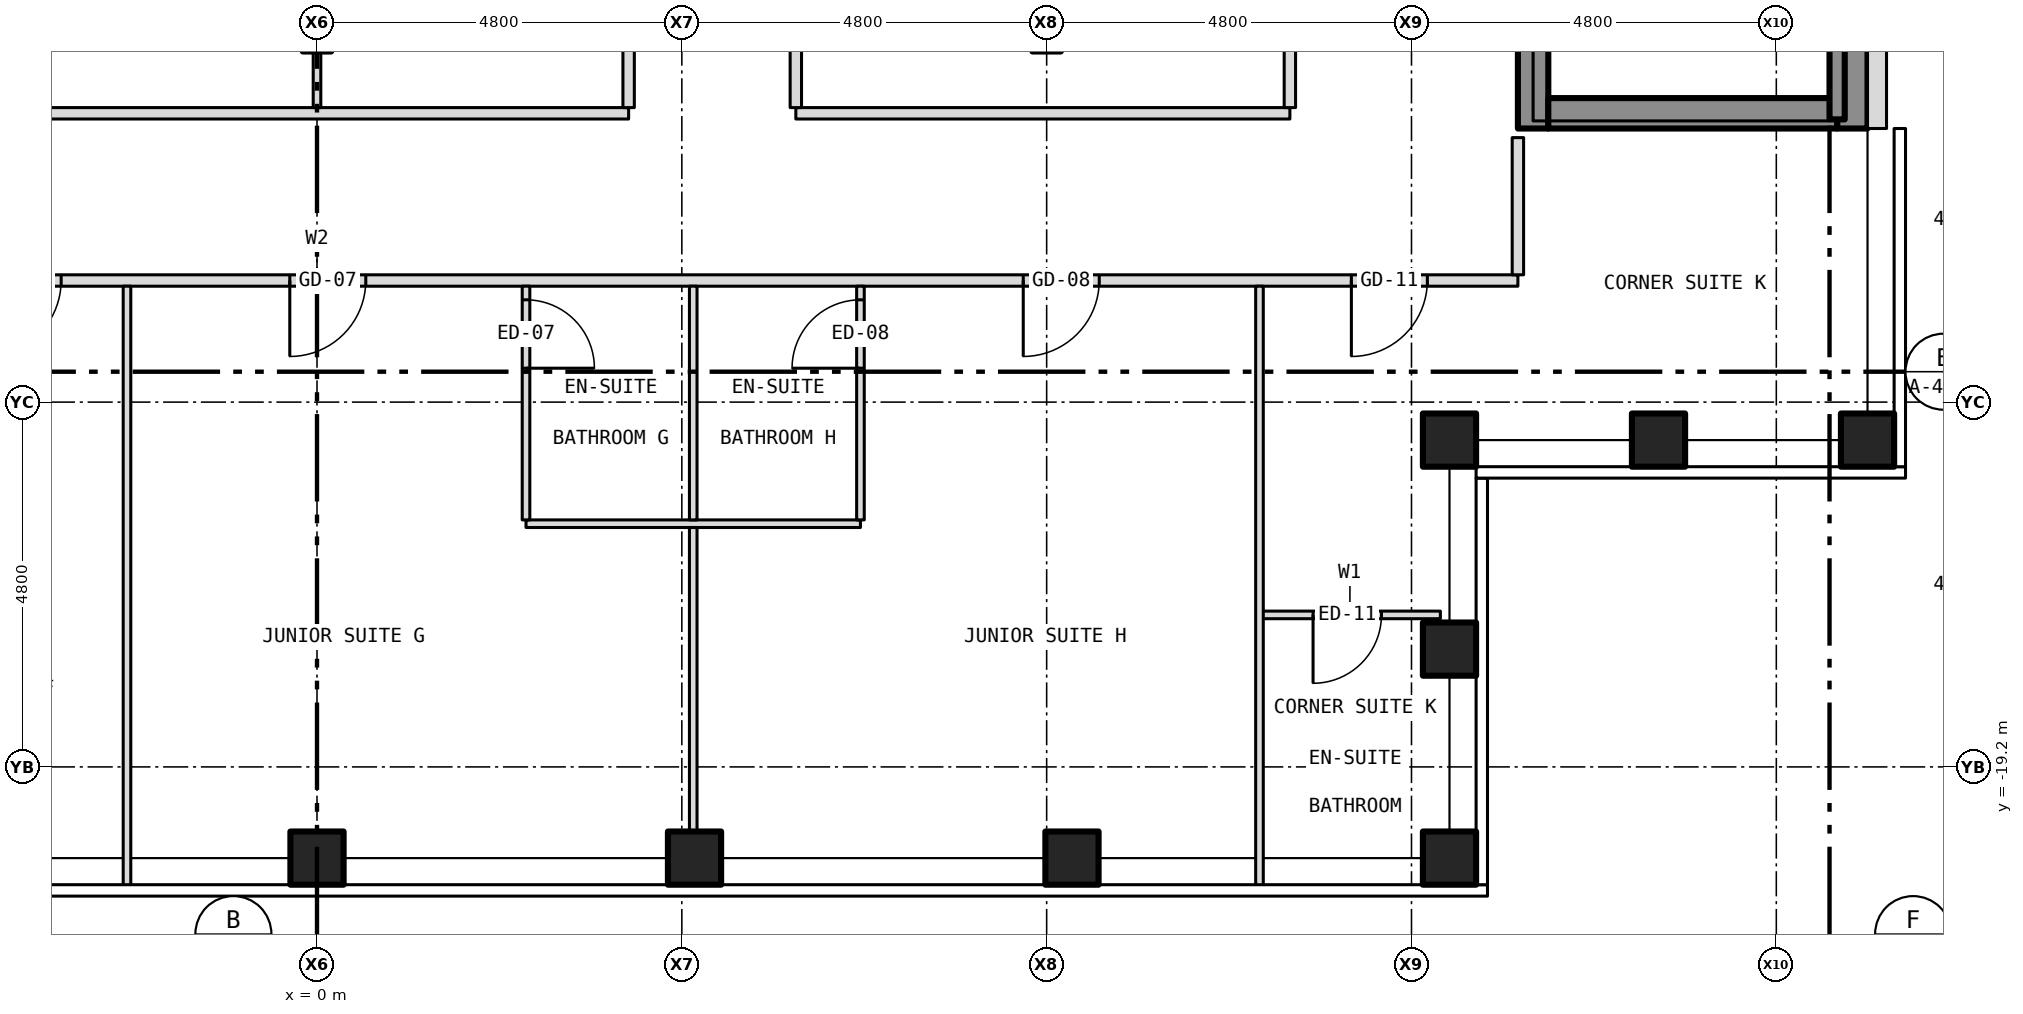
"""IFC4 building model, lengths in metres.
Left out: names, types, materials, properties, quantities, classifications, styles, units other than length and angle.
Written with IfcOpenShell. Run it as: python <this file> out.ifc"""

import sys

from ifc_helpers import new_model, si_unit, direction, frame, frame_2d, origin, origin_2d, place, context, subcontext, project, spatial, rectangle, hollow_rectangle, extrude, element, fill, save


model = new_model("IFC4")
c1 = context("Model", 3, precision=1e-05, world=origin(), true_north=direction((0.0, 1.0)))
c2 = subcontext(c1, "Body", "Model", "MODEL_VIEW")
j1 = project(units=[si_unit("LENGTHUNIT", "METRE"), si_unit("PLANEANGLEUNIT", "RADIAN")], contexts=[c1])
p1 = place(None, origin())
s1 = spatial("IfcSite", under=j1, at=p1, CompositionType="ELEMENT")
p2 = place(p1, origin())
s2 = spatial("IfcBuilding", under=s1, at=p2, CompositionType="ELEMENT")
p3 = place(p2, frame((0.0, 0.0, 205.0)))
s3 = spatial("IfcBuildingStorey", under=s2, at=p3, CompositionType="ELEMENT", Elevation=205.0)
for number, where, z_axis, x_axis in (
    (1, (0.0, -20.4, -0.15), (0.0, 0.0, 1.0), (1.0, 0.0, 0.0)),
    (2, (4.967, -20.4, -0.15), (0.0, 0.0, 1.0), (1.0, 0.0, 0.0)),
    (3, (9.933, -20.4, -0.15), (0.0, 0.0, 1.0), (1.0, 0.0, 0.0)),
    (4, (14.9, -20.4, -0.15), (0.0, 0.0, 1.0), (1.0, 0.0, 0.0)),
    (5, (20.4, -14.9, -0.15), (0.0, 0.0, 1.0), (1.0, 0.0, 0.0)),
    (6, (14.9, -14.9, -0.15), (0.0, 0.0, 1.0), (1.0, 0.0, 0.0)),
    (7, (14.9, -17.65, -0.15), (0.0, 0.0, 1.0), (1.0, 0.0, 0.0)),
    (8, (17.65, -14.9, -0.15), (0.0, 0.0, 1.0), (1.0, 0.0, 0.0)),
):
    element("IfcColumn", number, at=place(p3, frame(where, z_axis=z_axis, x_axis=x_axis)), inside=s3, PredefinedType="COLUMN", context=c2, shape_type="SweptSolid", body=[
        extrude(hollow_rectangle(XDim=0.7, YDim=0.7, WallThickness=0.04, at=origin_2d()), origin(), (0.0, 0.0, 1.0), 3.5),
    ])
p4 = place(p3, frame((16.0, -10.8, 0.0), z_axis=(0.0, 0.0, 1.0), x_axis=(0.0, 1.0, 0.0)))
e9 = element("IfcWall", 9, at=p4, inside=s3, PredefinedType="SHEAR", context=c2, shape_type="SweptSolid", body=[
    extrude(rectangle(XDim=21.6, YDim=0.4, at=frame_2d((10.8, 0.0))), origin(), (0.0, 0.0, 1.0), 3.25),
])
p5 = place(p4, frame((9.4, 0.0, 0.0)))
e10 = element("IfcOpeningElement", 10, at=p5, cuts=e9, PredefinedType="OPENING", context=c2, shape_type="SweptSolid", body=[
    extrude(rectangle(XDim=1.1, YDim=2.1, at=frame_2d((0.55, 1.05))), frame((0.0, 0.212, 0.0), z_axis=(0.0, -1.0, 0.0), x_axis=(1.0, 0.0, 0.0)), (0.0, 0.0, 1.0), 0.424),
])
p6 = place(p4, frame((11.5, 0.0, 0.0)))
e11 = element("IfcOpeningElement", 11, at=p6, cuts=e9, PredefinedType="OPENING", context=c2, shape_type="SweptSolid", body=[
    extrude(rectangle(XDim=1.1, YDim=2.1, at=frame_2d((0.55, 1.05))), frame((0.0, 0.212, 0.0), z_axis=(0.0, -1.0, 0.0), x_axis=(1.0, 0.0, 0.0)), (0.0, 0.0, 1.0), 0.424),
])
p7 = place(p4, frame((13.6, 0.0, 0.0)))
e12 = element("IfcOpeningElement", 12, at=p7, cuts=e9, PredefinedType="OPENING", context=c2, shape_type="SweptSolid", body=[
    extrude(rectangle(XDim=1.1, YDim=2.1, at=frame_2d((0.55, 1.05))), frame((0.0, 0.212, 0.0), z_axis=(0.0, -1.0, 0.0), x_axis=(1.0, 0.0, 0.0)), (0.0, 0.0, 1.0), 0.424),
])
p8 = place(p4, frame((15.7, 0.0, 0.0)))
e13 = element("IfcOpeningElement", 13, at=p8, cuts=e9, PredefinedType="OPENING", context=c2, shape_type="SweptSolid", body=[
    extrude(rectangle(XDim=1.1, YDim=2.1, at=frame_2d((0.55, 1.05))), frame((0.0, 0.212, 0.0), z_axis=(0.0, -1.0, 0.0), x_axis=(1.0, 0.0, 0.0)), (0.0, 0.0, 1.0), 0.424),
])
p9 = place(p4, frame((17.8, 0.0, 0.0)))
e14 = element("IfcOpeningElement", 14, at=p9, cuts=e9, PredefinedType="OPENING", context=c2, shape_type="SweptSolid", body=[
    extrude(rectangle(XDim=1.1, YDim=2.1, at=frame_2d((0.55, 1.05))), frame((0.0, 0.212, 0.0), z_axis=(0.0, -1.0, 0.0), x_axis=(1.0, 0.0, 0.0)), (0.0, 0.0, 1.0), 0.424),
])
p10 = place(p4, frame((5.642, 0.0, 0.0)))
e15 = element("IfcOpeningElement", 15, at=p10, cuts=e9, PredefinedType="OPENING", context=c2, shape_type="SweptSolid", body=[
    extrude(rectangle(XDim=1.1, YDim=2.1, at=frame_2d((0.55, 1.05))), frame((0.0, 0.212, 0.0), z_axis=(0.0, -1.0, 0.0), x_axis=(1.0, 0.0, 0.0)), (0.0, 0.0, 1.0), 0.424),
])
p11 = place(p4, frame((7.5, 0.0, 0.0)))
e16 = element("IfcOpeningElement", 16, at=p11, cuts=e9, PredefinedType="OPENING", context=c2, shape_type="SweptSolid", body=[
    extrude(rectangle(XDim=1.1, YDim=2.1, at=frame_2d((0.55, 1.05))), frame((0.0, 0.212, 0.0), z_axis=(0.0, -1.0, 0.0), x_axis=(1.0, 0.0, 0.0)), (0.0, 0.0, 1.0), 0.424),
])
p12 = place(p4, frame((20.0, 0.0, 0.0)))
e17 = element("IfcOpeningElement", 17, at=p12, cuts=e9, PredefinedType="OPENING", context=c2, shape_type="SweptSolid", body=[
    extrude(rectangle(XDim=0.9, YDim=2.1, at=frame_2d((0.45, 1.05))), frame((0.0, 0.212, 0.0), z_axis=(0.0, -1.0, 0.0), x_axis=(1.0, 0.0, 0.0)), (0.0, 0.0, 1.0), 0.424),
])
p13 = place(p3, frame((20.2, -10.8, 0.0), z_axis=(0.0, 0.0, 1.0), x_axis=(0.0, 1.0, 0.0)))
e18 = element("IfcWall", 18, at=p13, inside=s3, PredefinedType="SHEAR", context=c2, shape_type="SweptSolid", body=[
    extrude(rectangle(XDim=21.6, YDim=0.4, at=frame_2d((10.8, 0.0))), origin(), (0.0, 0.0, 1.0), 3.25),
])
p14 = place(p3, frame((16.2, -10.6, 0.0), z_axis=(0.0, 0.0, 1.0), x_axis=(1.0, 0.0, 0.0)))
e19 = element("IfcWall", 19, at=p14, inside=s3, PredefinedType="SHEAR", context=c2, shape_type="SweptSolid", body=[
    extrude(rectangle(XDim=3.8, YDim=0.4, at=frame_2d((1.9, 0.0))), origin(), (0.0, 0.0, 1.0), 3.25),
])
p15 = place(p3, frame((20.525, -10.8, 0.0), z_axis=(0.0, 0.0, 1.0), x_axis=(0.0, 1.0, 0.0)))
e20 = element("IfcWall", 20, at=p15, inside=s3, PredefinedType="SOLIDWALL", context=c2, shape_type="SweptSolid", body=[
    extrude(rectangle(XDim=21.6, YDim=0.25, at=frame_2d((10.8, 0.0))), origin(), (0.0, 0.0, 1.0), 3.5),
])
p16 = place(p15, frame((2.95, 0.0, 1.0)))
e21 = element("IfcOpeningElement", 21, at=p16, cuts=e20, PredefinedType="OPENING", context=c2, shape_type="SweptSolid", body=[
    extrude(rectangle(XDim=0.6, YDim=1.5, at=frame_2d((0.3, 0.75))), frame((0.0, 0.137, 0.0), z_axis=(0.0, -1.0, 0.0), x_axis=(1.0, 0.0, 0.0)), (0.0, 0.0, 1.0), 0.274),
])
p17 = place(p3, frame((12.4, -17.2, 0.0), z_axis=(0.0, 0.0, 1.0), x_axis=(1.0, 0.0, 0.0)))
e22 = element("IfcWall", 22, at=p17, inside=s3, PredefinedType="PARTITIONING", context=c2, shape_type="SweptSolid", body=[
    extrude(rectangle(XDim=2.38, YDim=0.1, at=frame_2d((1.19, 0.0))), origin(), (0.0, 0.0, 1.0), 3.35),
])
p18 = place(p17, frame((0.705, 0.0, 0.0)))
e23 = element("IfcOpeningElement", 23, at=p18, cuts=e22, PredefinedType="OPENING", context=c2, shape_type="SweptSolid", body=[
    extrude(rectangle(XDim=0.9, YDim=2.1, at=frame_2d((0.45, 1.05))), frame((0.0, 0.062, 0.0), z_axis=(0.0, -1.0, 0.0), x_axis=(1.0, 0.0, 0.0)), (0.0, 0.0, 1.0), 0.124),
])
p19 = place(p3, frame((2.75, -16.0, 0.0), z_axis=(0.0, 0.0, 1.0), x_axis=(1.0, 0.0, 0.0)))
e24 = element("IfcWall", 24, at=p19, inside=s3, PredefinedType="PARTITIONING", context=c2, shape_type="SweptSolid", body=[
    extrude(rectangle(XDim=4.4, YDim=0.1, at=frame_2d((2.2, 0.0))), origin(), (0.0, 0.0, 1.0), 3.35),
])
p20 = place(p3, frame((-15.8, -12.8, 0.0), z_axis=(0.0, 0.0, 1.0), x_axis=(1.0, 0.0, 0.0)))
e25 = element("IfcWall", 25, at=p20, inside=s3, PredefinedType="PARTITIONING", context=c2, shape_type="SweptSolid", body=[
    extrude(rectangle(XDim=31.6, YDim=0.15, at=frame_2d((15.8, 0.0))), origin(), (0.0, 0.0, 1.0), 3.35),
])
p21 = place(p20, frame((6.466, 0.0, 0.0)))
e26 = element("IfcOpeningElement", 26, at=p21, cuts=e25, PredefinedType="OPENING", context=c2, shape_type="SweptSolid", body=[
    extrude(rectangle(XDim=1.0, YDim=2.1, at=frame_2d((0.5, 1.05))), frame((0.0, 0.087, 0.0), z_axis=(0.0, -1.0, 0.0), x_axis=(1.0, 0.0, 0.0)), (0.0, 0.0, 1.0), 0.174),
])
p22 = place(p20, frame((11.434, 0.0, 0.0)))
e27 = element("IfcOpeningElement", 27, at=p22, cuts=e25, PredefinedType="OPENING", context=c2, shape_type="SweptSolid", body=[
    extrude(rectangle(XDim=1.0, YDim=2.1, at=frame_2d((0.5, 1.05))), frame((0.0, 0.087, 0.0), z_axis=(0.0, -1.0, 0.0), x_axis=(1.0, 0.0, 0.0)), (0.0, 0.0, 1.0), 0.174),
])
p23 = place(p20, frame((15.442, 0.0, 0.0)))
e28 = element("IfcOpeningElement", 28, at=p23, cuts=e25, PredefinedType="OPENING", context=c2, shape_type="SweptSolid", body=[
    extrude(rectangle(XDim=1.0, YDim=2.1, at=frame_2d((0.5, 1.05))), frame((0.0, 0.087, 0.0), z_axis=(0.0, -1.0, 0.0), x_axis=(1.0, 0.0, 0.0)), (0.0, 0.0, 1.0), 0.174),
])
p24 = place(p20, frame((25.092, 0.0, 0.0)))
e29 = element("IfcOpeningElement", 29, at=p24, cuts=e25, PredefinedType="OPENING", context=c2, shape_type="SweptSolid", body=[
    extrude(rectangle(XDim=1.0, YDim=2.1, at=frame_2d((0.5, 1.05))), frame((0.0, 0.087, 0.0), z_axis=(0.0, -1.0, 0.0), x_axis=(1.0, 0.0, 0.0)), (0.0, 0.0, 1.0), 0.174),
])
p25 = place(p20, frame((1.192, 0.0, 0.0)))
e30 = element("IfcOpeningElement", 30, at=p25, cuts=e25, PredefinedType="OPENING", context=c2, shape_type="SweptSolid", body=[
    extrude(rectangle(XDim=1.0, YDim=2.1, at=frame_2d((0.5, 1.05))), frame((0.0, 0.087, 0.0), z_axis=(0.0, -1.0, 0.0), x_axis=(1.0, 0.0, 0.0)), (0.0, 0.0, 1.0), 0.174),
])
p26 = place(p20, frame((29.409, 0.0, 0.0)))
e31 = element("IfcOpeningElement", 31, at=p26, cuts=e25, PredefinedType="OPENING", context=c2, shape_type="SweptSolid", body=[
    extrude(rectangle(XDim=1.0, YDim=2.1, at=frame_2d((0.5, 1.05))), frame((0.0, 0.087, 0.0), z_axis=(0.0, -1.0, 0.0), x_axis=(1.0, 0.0, 0.0)), (0.0, 0.0, 1.0), 0.174),
])
p27 = place(p3, frame((-12.8, -10.6, 0.0), z_axis=(0.0, 0.0, 1.0), x_axis=(1.0, 0.0, 0.0)))
e32 = element("IfcWall", 32, at=p27, inside=s3, PredefinedType="PARTITIONING", context=c2, shape_type="SweptSolid", body=[
    extrude(rectangle(XDim=16.9, YDim=0.15, at=frame_2d((8.45, 0.0))), origin(), (0.0, 0.0, 1.0), 3.35),
])
p28 = place(p27, frame((5.95, 0.0, 0.0)))
e33 = element("IfcOpeningElement", 33, at=p28, cuts=e32, PredefinedType="OPENING", context=c2, shape_type="SweptSolid", body=[
    extrude(rectangle(XDim=0.9, YDim=2.1, at=frame_2d((0.45, 1.05))), frame((0.0, 0.087, 0.0), z_axis=(0.0, -1.0, 0.0), x_axis=(1.0, 0.0, 0.0)), (0.0, 0.0, 1.0), 0.174),
])
p29 = place(p3, frame((6.3, -10.6, 0.0), z_axis=(0.0, 0.0, 1.0), x_axis=(1.0, 0.0, 0.0)))
e34 = element("IfcWall", 34, at=p29, inside=s3, PredefinedType="PARTITIONING", context=c2, shape_type="SweptSolid", body=[
    extrude(rectangle(XDim=6.5, YDim=0.15, at=frame_2d((3.25, 0.0))), origin(), (0.0, 0.0, 1.0), 3.35),
])
p30 = place(p3, frame((-2.5, -20.78, 0.0), z_axis=(0.0, 0.0, 1.0), x_axis=(0.0, 1.0, 0.0)))
e35 = element("IfcWall", 35, at=p30, inside=s3, PredefinedType="PARTITIONING", context=c2, shape_type="SweptSolid", body=[
    extrude(rectangle(XDim=7.905, YDim=0.1, at=frame_2d((3.953, 0.0))), origin(), (0.0, 0.0, 1.0), 3.35),
])
p31 = place(p3, frame((0.0, -10.525, 0.0), z_axis=(0.0, 0.0, 1.0), x_axis=(0.0, 1.0, 0.0)))
e36 = element("IfcWall", 36, at=p31, inside=s3, PredefinedType="PARTITIONING", context=c2, shape_type="SweptSolid", body=[
    extrude(rectangle(XDim=0.738, YDim=0.1, at=frame_2d((0.369, 0.0))), origin(), (0.0, 0.0, 1.0), 2.728),
])
p32 = place(p3, frame((2.75, -15.95, 0.0), z_axis=(0.0, 0.0, 1.0), x_axis=(0.0, 1.0, 0.0)))
e37 = element("IfcWall", 37, at=p32, inside=s3, PredefinedType="PARTITIONING", context=c2, shape_type="SweptSolid", body=[
    extrude(rectangle(XDim=3.075, YDim=0.1, at=frame_2d((1.538, 0.0))), origin(), (0.0, 0.0, 1.0), 3.35),
])
p33 = place(p32, frame((1.996, 0.0, 0.0)))
e38 = element("IfcOpeningElement", 38, at=p33, cuts=e37, PredefinedType="OPENING", context=c2, shape_type="SweptSolid", body=[
    extrude(rectangle(XDim=0.9, YDim=2.1, at=frame_2d((0.45, 1.05))), frame((0.0, 0.062, 0.0), z_axis=(0.0, -1.0, 0.0), x_axis=(1.0, 0.0, 0.0)), (0.0, 0.0, 1.0), 0.124),
])
p34 = place(p3, frame((4.1, -10.525, 0.0), z_axis=(0.0, 0.0, 1.0), x_axis=(0.0, 1.0, 0.0)))
e39 = element("IfcWall", 39, at=p34, inside=s3, PredefinedType="PARTITIONING", context=c2, shape_type="SweptSolid", body=[
    extrude(rectangle(XDim=17.95, YDim=0.15, at=frame_2d((8.975, 0.0))), origin(), (0.0, 0.0, 1.0), 3.35),
])
p35 = place(p34, frame((11.95, 0.0, 0.0)))
e40 = element("IfcOpeningElement", 40, at=p35, cuts=e39, PredefinedType="OPENING", context=c2, shape_type="SweptSolid", body=[
    extrude(rectangle(XDim=0.9, YDim=2.1, at=frame_2d((0.45, 1.05))), frame((0.0, 0.087, 0.0), z_axis=(0.0, -1.0, 0.0), x_axis=(1.0, 0.0, 0.0)), (0.0, 0.0, 1.0), 0.174),
])
p36 = place(p34, frame((4.775, 0.0, 0.0)))
e41 = element("IfcOpeningElement", 41, at=p36, cuts=e39, PredefinedType="OPENING", context=c2, shape_type="SweptSolid", body=[
    extrude(rectangle(XDim=0.9, YDim=2.1, at=frame_2d((0.45, 1.05))), frame((0.0, 0.087, 0.0), z_axis=(0.0, -1.0, 0.0), x_axis=(1.0, 0.0, 0.0)), (0.0, 0.0, 1.0), 0.174),
])
p37 = place(p3, frame((4.95, -20.28, 0.0), z_axis=(0.0, 0.0, 1.0), x_axis=(0.0, 1.0, 0.0)))
e42 = element("IfcWall", 42, at=p37, inside=s3, PredefinedType="PARTITIONING", context=c2, shape_type="SweptSolid", body=[
    extrude(rectangle(XDim=4.23, YDim=0.1, at=frame_2d((2.115, 0.0))), origin(), (0.0, 0.0, 1.0), 2.817),
])
p38 = place(p3, frame((4.95, -15.95, 0.0), z_axis=(0.0, 0.0, 1.0), x_axis=(0.0, 1.0, 0.0)))
e43 = element("IfcWall", 43, at=p38, inside=s3, PredefinedType="PARTITIONING", context=c2, shape_type="SweptSolid", body=[
    extrude(rectangle(XDim=3.075, YDim=0.1, at=frame_2d((1.538, 0.0))), origin(), (0.0, 0.0, 1.0), 2.817),
])
p39 = place(p3, frame((6.3, -10.525, 0.0), z_axis=(0.0, 0.0, 1.0), x_axis=(0.0, 1.0, 0.0)))
e44 = element("IfcWall", 44, at=p39, inside=s3, PredefinedType="PARTITIONING", context=c2, shape_type="SweptSolid", body=[
    extrude(rectangle(XDim=17.95, YDim=0.15, at=frame_2d((8.975, 0.0))), origin(), (0.0, 0.0, 1.0), 3.35),
])
p40 = place(p39, frame((13.825, 0.0, 0.0)))
e45 = element("IfcOpeningElement", 45, at=p40, cuts=e44, PredefinedType="OPENING", context=c2, shape_type="SweptSolid", body=[
    extrude(rectangle(XDim=0.9, YDim=2.1, at=frame_2d((0.45, 1.05))), frame((0.0, 0.087, 0.0), z_axis=(0.0, -1.0, 0.0), x_axis=(1.0, 0.0, 0.0)), (0.0, 0.0, 1.0), 0.174),
])
p41 = place(p39, frame((4.775, 0.0, 0.0)))
e46 = element("IfcOpeningElement", 46, at=p41, cuts=e44, PredefinedType="OPENING", context=c2, shape_type="SweptSolid", body=[
    extrude(rectangle(XDim=0.9, YDim=2.1, at=frame_2d((0.45, 1.05))), frame((0.0, 0.087, 0.0), z_axis=(0.0, -1.0, 0.0), x_axis=(1.0, 0.0, 0.0)), (0.0, 0.0, 1.0), 0.174),
])
p42 = place(p3, frame((7.15, -15.95, 0.0), z_axis=(0.0, 0.0, 1.0), x_axis=(0.0, 1.0, 0.0)))
e47 = element("IfcWall", 47, at=p42, inside=s3, PredefinedType="PARTITIONING", context=c2, shape_type="SweptSolid", body=[
    extrude(rectangle(XDim=3.075, YDim=0.1, at=frame_2d((1.538, 0.0))), origin(), (0.0, 0.0, 1.0), 3.35),
])
p43 = place(p42, frame((1.996, 0.0, 0.0)))
e48 = element("IfcOpeningElement", 48, at=p43, cuts=e47, PredefinedType="OPENING", context=c2, shape_type="SweptSolid", body=[
    extrude(rectangle(XDim=0.9, YDim=2.1, at=frame_2d((0.45, 1.05))), frame((0.0, 0.062, 0.0), z_axis=(0.0, -1.0, 0.0), x_axis=(1.0, 0.0, 0.0)), (0.0, 0.0, 1.0), 0.124),
])
p44 = place(p3, frame((12.4, -20.78, 0.0), z_axis=(0.0, 0.0, 1.0), x_axis=(0.0, 1.0, 0.0)))
e49 = element("IfcWall", 49, at=p44, inside=s3, PredefinedType="PARTITIONING", context=c2, shape_type="SweptSolid", body=[
    extrude(rectangle(XDim=7.905, YDim=0.1, at=frame_2d((3.953, 0.0))), origin(), (0.0, 0.0, 1.0), 3.35),
])
p45 = place(p3, frame((12.8, -10.525, 0.0), z_axis=(0.0, 0.0, 1.0), x_axis=(0.0, 1.0, 0.0)))
e50 = element("IfcWall", 50, at=p45, inside=s3, PredefinedType="PARTITIONING", context=c2, shape_type="SweptSolid", body=[
    extrude(rectangle(XDim=8.525, YDim=0.15, at=frame_2d((4.262, 0.0))), origin(), (0.0, 0.0, 1.0), 3.35),
])
p46 = place(p3, frame((15.8, -12.725, 0.0), z_axis=(0.0, 0.0, 1.0), x_axis=(0.0, 1.0, 0.0)))
e51 = element("IfcWall", 51, at=p46, inside=s3, PredefinedType="PARTITIONING", context=c2, shape_type="SweptSolid", body=[
    extrude(rectangle(XDim=1.805, YDim=0.15, at=frame_2d((0.903, 0.0))), origin(), (0.0, 0.0, 1.0), 3.35),
])
p47 = place(p3, frame((20.0, -10.68, 0.0), z_axis=(0.0, 0.0, 1.0), x_axis=(0.0, 1.0, 0.0)))
e52 = element("IfcWall", 52, at=p47, inside=s3, PredefinedType="SHEAR", context=c2, shape_type="SweptSolid", body=[
    extrude(rectangle(XDim=6.98, YDim=0.2, at=frame_2d((3.49, 0.0))), origin(), (0.0, 0.0, 1.0), 3.25),
])
p48 = place(p22, origin())
e53 = element("IfcDoor", 53, at=p48, inside=s3, OperationType="SINGLE_SWING_LEFT", PredefinedType="DOOR", context=c2, shape_type="SweptSolid", body=[
    extrude(rectangle(XDim=1.0, YDim=2.1, at=frame_2d((0.5, 1.05))), frame((0.0, 0.025, 0.0), z_axis=(0.0, -1.0, 0.0), x_axis=(1.0, 0.0, 0.0)), (0.0, 0.0, 1.0), 0.05),
])
fill(e27, e53)
p49 = place(p23, origin())
e54 = element("IfcDoor", 54, at=p49, inside=s3, OperationType="SINGLE_SWING_LEFT", PredefinedType="DOOR", context=c2, shape_type="SweptSolid", body=[
    extrude(rectangle(XDim=1.0, YDim=2.1, at=frame_2d((0.5, 1.05))), frame((0.0, 0.025, 0.0), z_axis=(0.0, -1.0, 0.0), x_axis=(1.0, 0.0, 0.0)), (0.0, 0.0, 1.0), 0.05),
])
fill(e28, e54)
p50 = place(p33, origin())
e55 = element("IfcDoor", 55, at=p50, inside=s3, OperationType="SINGLE_SWING_LEFT", PredefinedType="DOOR", context=c2, shape_type="SweptSolid", body=[
    extrude(rectangle(XDim=0.9, YDim=2.1, at=frame_2d((0.45, 1.05))), frame((0.0, 0.025, 0.0), z_axis=(0.0, -1.0, 0.0), x_axis=(1.0, 0.0, 0.0)), (0.0, 0.0, 1.0), 0.05),
])
fill(e38, e55)
p51 = place(p24, origin())
e56 = element("IfcDoor", 56, at=p51, inside=s3, OperationType="SINGLE_SWING_LEFT", PredefinedType="DOOR", context=c2, shape_type="SweptSolid", body=[
    extrude(rectangle(XDim=1.0, YDim=2.1, at=frame_2d((0.5, 1.05))), frame((0.0, 0.025, 0.0), z_axis=(0.0, -1.0, 0.0), x_axis=(1.0, 0.0, 0.0)), (0.0, 0.0, 1.0), 0.05),
])
fill(e29, e56)
p52 = place(p43, origin())
e57 = element("IfcDoor", 57, at=p52, inside=s3, OperationType="SINGLE_SWING_LEFT", PredefinedType="DOOR", context=c2, shape_type="SweptSolid", body=[
    extrude(rectangle(XDim=0.9, YDim=2.1, at=frame_2d((0.45, 1.05))), frame((0.0, 0.025, 0.0), z_axis=(0.0, -1.0, 0.0), x_axis=(1.0, 0.0, 0.0)), (0.0, 0.0, 1.0), 0.05),
])
fill(e48, e57)
p53 = place(p18, origin())
e58 = element("IfcDoor", 58, at=p53, inside=s3, OperationType="SINGLE_SWING_LEFT", PredefinedType="DOOR", context=c2, shape_type="SweptSolid", body=[
    extrude(rectangle(XDim=0.9, YDim=2.1, at=frame_2d((0.45, 1.05))), frame((0.0, 0.025, 0.0), z_axis=(0.0, -1.0, 0.0), x_axis=(1.0, 0.0, 0.0)), (0.0, 0.0, 1.0), 0.05),
])
fill(e23, e58)
p54 = place(p26, origin())
e59 = element("IfcDoor", 59, at=p54, inside=s3, OperationType="SINGLE_SWING_LEFT", PredefinedType="DOOR", context=c2, shape_type="SweptSolid", body=[
    extrude(rectangle(XDim=1.0, YDim=2.1, at=frame_2d((0.5, 1.05))), frame((0.0, 0.025, 0.0), z_axis=(0.0, -1.0, 0.0), x_axis=(1.0, 0.0, 0.0)), (0.0, 0.0, 1.0), 0.05),
])
fill(e31, e59)
save(model, sys.argv[1])
